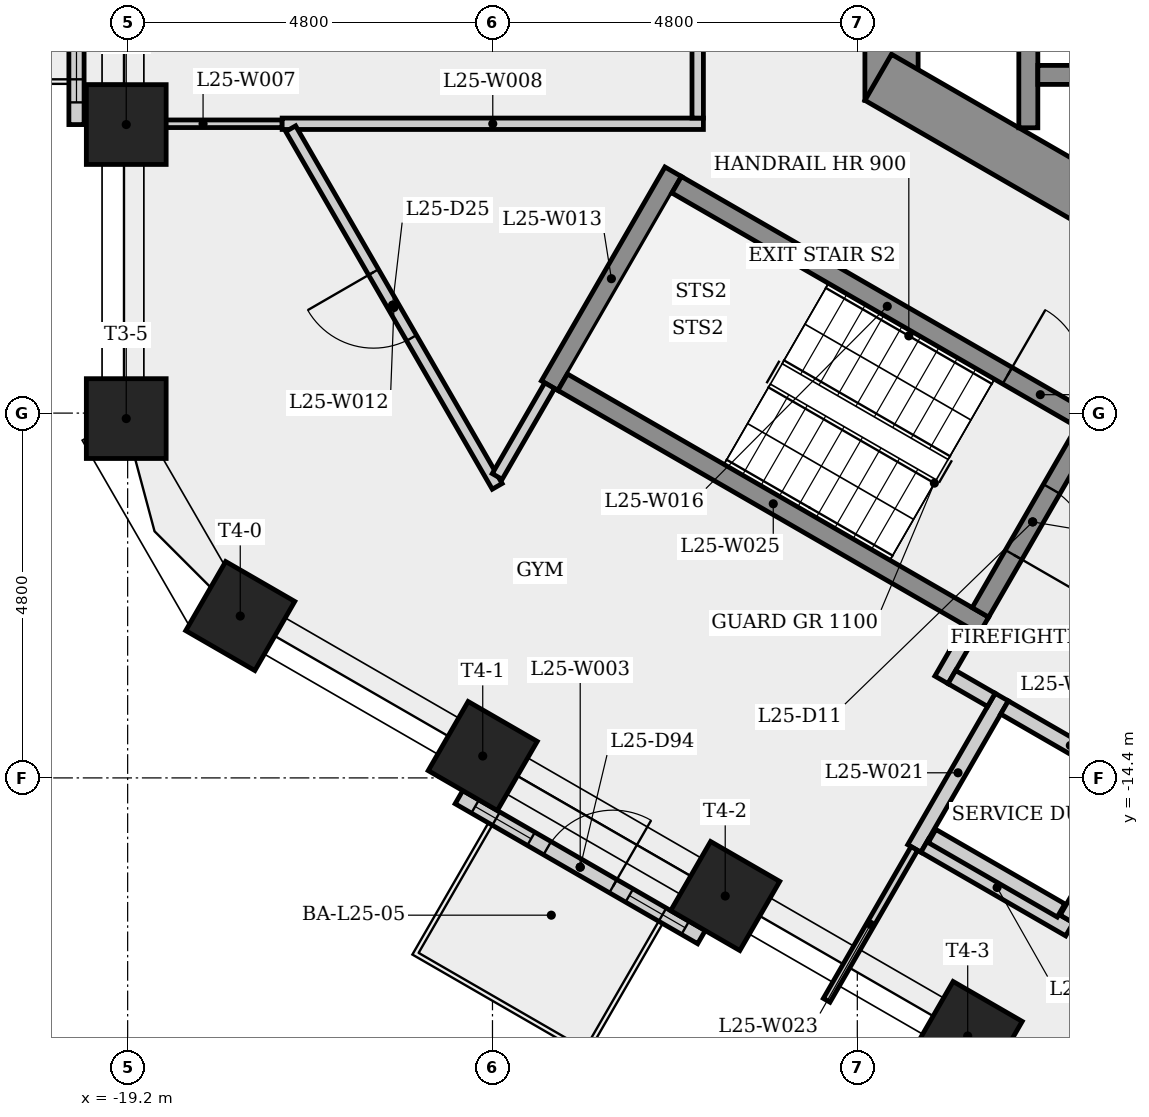
"""IFC4 building model, lengths in metres.
Left out: names, types, materials, properties, quantities, classifications, styles, units other than length and angle.
Written with IfcOpenShell. Run it as: python <this file> out.ifc"""

import sys

from ifc_helpers import new_model, si_unit, direction, frame, frame_2d, origin, origin_2d, place, context, subcontext, project, spatial, rectangle, extrude, element, fill, save


model = new_model("IFC4")
c1 = context("Model", 3, precision=1e-05, world=origin(), true_north=direction((0.0, 1.0)))
c2 = subcontext(c1, "Body", "Model", "MODEL_VIEW")
j1 = project(units=[si_unit("LENGTHUNIT", "METRE"), si_unit("PLANEANGLEUNIT", "RADIAN")], contexts=[c1])
p1 = place(None, origin())
s1 = spatial("IfcSite", under=j1, at=p1, CompositionType="ELEMENT")
p2 = place(p1, origin())
s2 = spatial("IfcBuilding", under=s1, at=p2, CompositionType="ELEMENT")
p3 = place(p2, frame((0.0, 0.0, 96.7)))
s3 = spatial("IfcBuildingStorey", under=s2, at=p3, CompositionType="ELEMENT", Elevation=96.7)
p4 = place(p3, frame((-9.15, 5.485, 0.0), z_axis=(0.0, 0.0, 1.0), x_axis=(0.0, -1.0, 0.0)))
e1 = element("IfcWall", 1, at=p4, inside=s3, PredefinedType="SHEAR", context=c2, shape_type="SweptSolid", body=[
    extrude(rectangle(XDim=10.97, YDim=0.7, at=frame_2d((5.485, 0.0))), origin(), (0.0, 0.0, 1.0), 3.4),
])
p5 = place(p4, frame((4.685, 0.0, 0.0)))
e2 = element("IfcOpeningElement", 2, at=p5, cuts=e1, PredefinedType="OPENING", context=c2, shape_type="SweptSolid", body=[
    extrude(rectangle(XDim=1.6, YDim=2.1, at=frame_2d((0.8, 1.05))), frame((0.0, 0.36, 0.0), z_axis=(0.0, -1.0, 0.0), x_axis=(1.0, 0.0, 0.0)), (0.0, 0.0, 1.0), 0.72),
])
p6 = place(p3, frame((-9.325, -5.182, 0.0), z_axis=(0.0, 0.0, 1.0), x_axis=(0.866023993627, -0.500002442456, 0.0)))
e3 = element("IfcWall", 3, at=p6, inside=s3, PredefinedType="SHEAR", context=c2, shape_type="SweptSolid", body=[
    extrude(rectangle(XDim=10.97, YDim=0.7, at=frame_2d((5.485, 0.0))), origin(), (0.0, 0.0, 1.0), 3.4),
])
p7 = place(p6, frame((3.164, 0.0, 0.0)))
e4 = element("IfcOpeningElement", 4, at=p7, cuts=e3, PredefinedType="OPENING", context=c2, shape_type="SweptSolid", body=[
    extrude(rectangle(XDim=0.9, YDim=2.1, at=frame_2d((0.45, 1.05))), frame((0.0, 0.36, 0.0), z_axis=(0.0, -1.0, 0.0), x_axis=(1.0, 0.0, 0.0)), (0.0, 0.0, 1.0), 0.72),
])
for number, where, z_axis, x_axis in (
    (5, (-19.219, -5.803, 0.0), (0.0, 0.0, 1.0), (-1.0, 0.0, 0.0)),
    (6, (-19.219, -9.672, 0.0), (0.0, 0.0, 1.0), (-1.0, 0.0, 0.0)),
    (7, (-17.719, -12.27, 0.0), (0.0, 0.0, 1.0), (-0.5, -0.866, 0.0)),
    (8, (-14.528, -14.112, 0.0), (0.0, 0.0, 1.0), (-0.5, -0.866, 0.0)),
    (9, (-11.338, -15.954, 0.0), (0.0, 0.0, 1.0), (-0.5, -0.866, 0.0)),
    (10, (-8.148, -17.796, 0.0), (0.0, 0.0, 1.0), (-0.5, -0.866, 0.0)),
):
    element("IfcColumn", number, at=place(p3, frame(where, z_axis=z_axis, x_axis=x_axis)), inside=s3, PredefinedType="COLUMN", context=c2, shape_type="SweptSolid", body=[
        extrude(rectangle(XDim=1.05, YDim=1.05, at=origin_2d()), origin(), (0.0, 0.0, 1.0), 3.4),
    ])
p8 = place(p3, frame((-19.873, -1.935, 0.0), z_axis=(0.0, 0.0, 1.0), x_axis=(0.0, -1.0, 0.0)))
e11 = element("IfcWall", 11, at=p8, inside=s3, PredefinedType="SOLIDWALL", context=c2, shape_type="SweptSolid", body=[
    extrude(rectangle(XDim=3.869, YDim=0.2, at=frame_2d((1.935, 0.0))), origin(), (0.0, 0.0, 1.0), 3.4),
])
p9 = place(p8, frame((1.435, 0.0, 0.0)))
e12 = element("IfcOpeningElement", 12, at=p9, cuts=e11, PredefinedType="OPENING", context=c2, shape_type="SweptSolid", body=[
    extrude(rectangle(XDim=1.0, YDim=2.4, at=frame_2d((0.5, 1.2))), frame((0.0, 0.11, 0.0), z_axis=(0.0, -1.0, 0.0), x_axis=(1.0, 0.0, 0.0)), (0.0, 0.0, 1.0), 0.22),
])
p10 = place(p8, frame((0.292, 0.0, 0.9)))
e13 = element("IfcOpeningElement", 13, at=p10, cuts=e11, PredefinedType="OPENING", context=c2, shape_type="SweptSolid", body=[
    extrude(rectangle(XDim=0.85, YDim=1.5, at=frame_2d((0.425, 0.75))), frame((0.0, 0.11, 0.0), z_axis=(0.0, -1.0, 0.0), x_axis=(1.0, 0.0, 0.0)), (0.0, 0.0, 1.0), 0.22),
])
p11 = place(p8, frame((2.727, 0.0, 0.9)))
e14 = element("IfcOpeningElement", 14, at=p11, cuts=e11, PredefinedType="OPENING", context=c2, shape_type="SweptSolid", body=[
    extrude(rectangle(XDim=0.85, YDim=1.5, at=frame_2d((0.425, 0.75))), frame((0.0, 0.11, 0.0), z_axis=(0.0, -1.0, 0.0), x_axis=(1.0, 0.0, 0.0)), (0.0, 0.0, 1.0), 0.22),
])
p12 = place(p3, frame((-14.841, -14.653, 0.0), z_axis=(0.0, 0.0, 1.0), x_axis=(0.866048742478, -0.499959574017, 0.0)))
e15 = element("IfcWall", 15, at=p12, inside=s3, PredefinedType="SOLIDWALL", context=c2, shape_type="SweptSolid", body=[
    extrude(rectangle(XDim=3.684, YDim=0.2, at=frame_2d((1.842, 0.0))), origin(), (0.0, 0.0, 1.0), 3.4),
])
p13 = place(p12, frame((1.342, 0.0, 0.0)))
e16 = element("IfcOpeningElement", 16, at=p13, cuts=e15, PredefinedType="OPENING", context=c2, shape_type="SweptSolid", body=[
    extrude(rectangle(XDim=1.0, YDim=2.4, at=frame_2d((0.5, 1.2))), frame((0.0, 0.11, 0.0), z_axis=(0.0, -1.0, 0.0), x_axis=(1.0, 0.0, 0.0)), (0.0, 0.0, 1.0), 0.22),
])
p14 = place(p12, frame((0.246, 0.0, 0.9)))
e17 = element("IfcOpeningElement", 17, at=p14, cuts=e15, PredefinedType="OPENING", context=c2, shape_type="SweptSolid", body=[
    extrude(rectangle(XDim=0.85, YDim=1.5, at=frame_2d((0.425, 0.75))), frame((0.0, 0.11, 0.0), z_axis=(0.0, -1.0, 0.0), x_axis=(1.0, 0.0, 0.0)), (0.0, 0.0, 1.0), 0.22),
])
p15 = place(p12, frame((2.588, 0.0, 0.9)))
e18 = element("IfcOpeningElement", 18, at=p15, cuts=e15, PredefinedType="OPENING", context=c2, shape_type="SweptSolid", body=[
    extrude(rectangle(XDim=0.85, YDim=1.5, at=frame_2d((0.425, 0.75))), frame((0.0, 0.11, 0.0), z_axis=(0.0, -1.0, 0.0), x_axis=(1.0, 0.0, 0.0)), (0.0, 0.0, 1.0), 0.22),
])
p16 = place(p3, frame((-17.167, -5.793, 0.0), z_axis=(0.0, 0.0, 1.0), x_axis=(-1.0, 0.0, 0.0)))
e19 = element("IfcWall", 19, at=p16, inside=s3, PredefinedType="PARTITIONING", context=c2, shape_type="SweptSolid", body=[
    extrude(rectangle(XDim=2.081, YDim=0.1, at=frame_2d((1.041, 0.0))), origin(), (0.0, 0.0, 1.0), 3.05),
])
p17 = place(p3, frame((-17.167, -5.793, 0.0), z_axis=(0.0, 0.0, 1.0), x_axis=(1.0, 0.0, 0.0)))
e20 = element("IfcWall", 20, at=p17, inside=s3, PredefinedType="PARTITIONING", context=c2, shape_type="SweptSolid", body=[
    extrude(rectangle(XDim=5.542, YDim=0.15, at=frame_2d((2.771, 0.0))), origin(), (0.0, 0.0, 1.0), 3.05),
])
p18 = place(p3, frame((-14.338, -10.564, 0.0), z_axis=(0.0, 0.0, 1.0), x_axis=(-0.499985629884, 0.866033700216, 0.0)))
e21 = element("IfcWall", 21, at=p18, inside=s3, PredefinedType="PARTITIONING", context=c2, shape_type="SweptSolid", body=[
    extrude(rectangle(XDim=5.434, YDim=0.15, at=frame_2d((2.717, 0.0))), origin(), (0.0, 0.0, 1.0), 3.05),
])
p19 = place(p18, frame((2.254, 0.0, 0.0)))
e22 = element("IfcOpeningElement", 22, at=p19, cuts=e21, PredefinedType="OPENING", context=c2, shape_type="SweptSolid", body=[
    extrude(rectangle(XDim=1.0, YDim=2.1, at=frame_2d((0.5, 1.05))), frame((0.0, 0.085, 0.0), z_axis=(0.0, -1.0, 0.0), x_axis=(1.0, 0.0, 0.0)), (0.0, 0.0, 1.0), 0.17),
])
p20 = place(p3, frame((-13.648, -9.239, 0.0), z_axis=(0.0, 0.0, 1.0), x_axis=(0.500017246033, 0.866015446554, 0.0)))
e23 = element("IfcWall", 23, at=p20, inside=s3, PredefinedType="SHEAR", context=c2, shape_type="SweptSolid", body=[
    extrude(rectangle(XDim=3.25, YDim=0.25, at=frame_2d((1.625, 0.0))), origin(), (0.0, 0.0, 1.0), 3.05),
])
p21 = place(p3, frame((-13.648, -9.239, 0.0), z_axis=(0.0, 0.0, 1.0), x_axis=(-0.500115484592, -0.865958718457, 0.0)))
e24 = element("IfcWall", 24, at=p21, inside=s3, PredefinedType="PARTITIONING", context=c2, shape_type="SweptSolid", body=[
    extrude(rectangle(XDim=1.38, YDim=0.15, at=frame_2d((0.69, 0.0))), origin(), (0.0, 0.0, 1.0), 3.05),
])
p22 = place(p3, frame((-11.977, -6.595, 0.0), z_axis=(0.0, 0.0, 1.0), x_axis=(0.866025499775, -0.499999833739, 0.0)))
e25 = element("IfcWall", 25, at=p22, inside=s3, PredefinedType="SHEAR", context=c2, shape_type="SweptSolid", body=[
    extrude(rectangle(XDim=6.4, YDim=0.25, at=frame_2d((3.2, 0.0))), origin(), (0.0, 0.0, 1.0), 3.05),
])
p23 = place(p22, frame((5.025, 0.0, 0.0)))
e26 = element("IfcOpeningElement", 26, at=p23, cuts=e25, PredefinedType="OPENING", context=c2, shape_type="SweptSolid", body=[
    extrude(rectangle(XDim=1.0, YDim=2.1, at=frame_2d((0.5, 1.05))), frame((0.0, 0.135, 0.0), z_axis=(0.0, -1.0, 0.0), x_axis=(1.0, 0.0, 0.0)), (0.0, 0.0, 1.0), 0.27),
])
p24 = place(p3, frame((-11.7, -5.718, 0.0), z_axis=(0.0, 0.0, 1.0), x_axis=(0.0, 1.0, 0.0)))
e27 = element("IfcWall", 27, at=p24, inside=s3, PredefinedType="PARTITIONING", context=c2, shape_type="SweptSolid", body=[
    extrude(rectangle(XDim=11.436, YDim=0.15, at=frame_2d((5.718, 0.0))), origin(), (0.0, 0.0, 1.0), 3.05),
])
p25 = place(p24, frame((8.092, 0.0, 0.0)))
e28 = element("IfcOpeningElement", 28, at=p25, cuts=e27, PredefinedType="OPENING", context=c2, shape_type="SweptSolid", body=[
    extrude(rectangle(XDim=1.0, YDim=2.1, at=frame_2d((0.5, 1.05))), frame((0.0, 0.085, 0.0), z_axis=(0.0, -1.0, 0.0), x_axis=(1.0, 0.0, 0.0)), (0.0, 0.0, 1.0), 0.17),
])
p26 = place(p24, frame((2.344, 0.0, 0.0)))
e29 = element("IfcOpeningElement", 29, at=p26, cuts=e27, PredefinedType="OPENING", context=c2, shape_type="SweptSolid", body=[
    extrude(rectangle(XDim=1.0, YDim=2.1, at=frame_2d((0.5, 1.05))), frame((0.0, 0.085, 0.0), z_axis=(0.0, -1.0, 0.0), x_axis=(1.0, 0.0, 0.0)), (0.0, 0.0, 1.0), 0.17),
])
p27 = place(p3, frame((-8.85, -15.329, 0.0), z_axis=(0.0, 0.0, 1.0), x_axis=(0.500077740698, 0.865980515519, 0.0)))
e30 = element("IfcWall", 30, at=p27, inside=s3, PredefinedType="PLUMBINGWALL", context=c2, shape_type="SweptSolid", body=[
    extrude(rectangle(XDim=2.3, YDim=0.2, at=frame_2d((1.15, 0.0))), origin(), (0.0, 0.0, 1.0), 3.05),
])
p28 = place(p3, frame((-8.85, -15.329, 0.0), z_axis=(0.0, 0.0, 1.0), x_axis=(-0.500009533716, -0.866019899421, 0.0)))
e31 = element("IfcWall", 31, at=p28, inside=s3, PredefinedType="PARTITIONING", context=c2, shape_type="SweptSolid", body=[
    extrude(rectangle(XDim=2.307, YDim=0.1, at=frame_2d((1.153, 0.0))), origin(), (0.0, 0.0, 1.0), 3.05),
])
p29 = place(p3, frame((-8.493, -13.11, 0.0), z_axis=(0.0, 0.0, 1.0), x_axis=(0.500067724834, 0.865986299303, 0.0)))
e32 = element("IfcWall", 32, at=p29, inside=s3, PredefinedType="PARTITIONING", context=c2, shape_type="SweptSolid", body=[
    extrude(rectangle(XDim=0.775, YDim=0.2, at=frame_2d((0.388, 0.0))), origin(), (0.0, 0.0, 1.0), 3.05),
])
p30 = place(p3, frame((-7.935, -12.393, 0.0), z_axis=(0.0, 0.0, 1.0), x_axis=(-0.866025499775, 0.499999833739, 0.0)))
e33 = element("IfcWall", 33, at=p30, inside=s3, PredefinedType="SHEAR", context=c2, shape_type="SweptSolid", body=[
    extrude(rectangle(XDim=6.4, YDim=0.25, at=frame_2d((3.2, 0.0))), origin(), (0.0, 0.0, 1.0), 3.05),
])
p31 = place(p3, frame((-7.836, -13.373, 0.0), z_axis=(0.0, 0.0, 1.0), x_axis=(-0.866232998003, 0.499640263761, 0.0)))
e34 = element("IfcWall", 34, at=p31, inside=s3, PredefinedType="PARTITIONING", context=c2, shape_type="SweptSolid", body=[
    extrude(rectangle(XDim=0.6, YDim=0.2, at=frame_2d((0.3, 0.0))), origin(), (0.0, 0.0, 1.0), 3.05),
])
p32 = place(p3, frame((-7.35, -5.846, 0.0), z_axis=(0.0, 0.0, 1.0), x_axis=(0.0, 1.0, 0.0)))
e35 = element("IfcWall", 35, at=p32, inside=s3, PredefinedType="SHEAR", context=c2, shape_type="SweptSolid", body=[
    extrude(rectangle(XDim=4.171, YDim=0.25, at=frame_2d((2.085, 0.0))), origin(), (0.0, 0.0, 1.0), 3.05),
])
p33 = place(p3, frame((-6.808, -16.392, 0.0), z_axis=(0.0, 0.0, 1.0), x_axis=(-0.866008176907, 0.50002983664, 0.0)))
e36 = element("IfcWall", 36, at=p33, inside=s3, PredefinedType="PLUMBINGWALL", context=c2, shape_type="SweptSolid", body=[
    extrude(rectangle(XDim=2.2, YDim=0.2, at=frame_2d((1.1, 0.0))), origin(), (0.0, 0.0, 1.0), 3.05),
])
p34 = place(p3, frame((-6.605, -9.841, 0.0), z_axis=(0.0, 0.0, 1.0), x_axis=(-0.499996545922, -0.866027397988, 0.0)))
e37 = element("IfcWall", 37, at=p34, inside=s3, PredefinedType="SHEAR", context=c2, shape_type="SweptSolid", body=[
    extrude(rectangle(XDim=2.75, YDim=0.25, at=frame_2d((1.375, 0.0))), origin(), (0.0, 0.0, 1.0), 3.05),
])
p35 = place(p34, frame((0.875, 0.0, 0.0)))
e38 = element("IfcOpeningElement", 38, at=p35, cuts=e37, PredefinedType="OPENING", context=c2, shape_type="SweptSolid", body=[
    extrude(rectangle(XDim=1.0, YDim=2.1, at=frame_2d((0.5, 1.05))), frame((0.0, 0.135, 0.0), z_axis=(0.0, -1.0, 0.0), x_axis=(1.0, 0.0, 0.0)), (0.0, 0.0, 1.0), 0.27),
])
p36 = place(p3, frame((-5.795, -14.437, 0.0), z_axis=(0.0, 0.0, 1.0), x_axis=(-0.500027713859, -0.866009402589, 0.0)))
e39 = element("IfcWall", 39, at=p36, inside=s3, PredefinedType="PLUMBINGWALL", context=c2, shape_type="SweptSolid", body=[
    extrude(rectangle(XDim=2.1, YDim=0.2, at=frame_2d((1.05, 0.0))), origin(), (0.0, 0.0, 1.0), 3.05),
])
p37 = place(p3, frame((-5.931, -14.473, 0.0), z_axis=(0.0, 0.0, 1.0), x_axis=(-0.866041268327, 0.499972520799, 0.0)))
e40 = element("IfcWall", 40, at=p37, inside=s3, PredefinedType="PLUMBINGWALL", context=c2, shape_type="SweptSolid", body=[
    extrude(rectangle(XDim=2.0, YDim=0.2, at=frame_2d((1.0, 0.0))), origin(), (0.0, 0.0, 1.0), 3.05),
])
p38 = place(p3, frame((-7.225, -5.15, 0.0), z_axis=(0.0, 0.0, 1.0), x_axis=(1.0, 0.0, 0.0)))
e41 = element("IfcWall", 41, at=p38, inside=s3, PredefinedType="SHEAR", context=c2, shape_type="SweptSolid", body=[
    extrude(rectangle(XDim=14.7, YDim=0.25, at=frame_2d((7.35, 0.0))), origin(), (0.0, 0.0, 1.0), 3.05),
])
p39 = place(p3, frame((-6.919, -16.144, 0.0), z_axis=(0.0, 0.0, 1.0), x_axis=(-0.866042469362, 0.499970440388, 0.0)))
e42 = element("IfcWall", 42, at=p39, inside=s3, PredefinedType="PLUMBINGWALL", context=c2, shape_type="SweptSolid", body=[
    extrude(rectangle(XDim=1.96, YDim=0.2, at=frame_2d((0.98, 0.0))), origin(), (0.0, 0.0, 1.0), 3.05),
])
p40 = place(p11, origin())
e43 = element("IfcWindow", 43, at=p40, inside=s3, PartitioningType="SINGLE_PANEL", PredefinedType="WINDOW", context=c2, shape_type="SweptSolid", body=[
    extrude(rectangle(XDim=0.85, YDim=1.5, at=frame_2d((0.425, 0.75))), frame((0.0, 0.03, 0.0), z_axis=(0.0, -1.0, 0.0), x_axis=(1.0, 0.0, 0.0)), (0.0, 0.0, 1.0), 0.06),
])
fill(e14, e43)
p41 = place(p13, origin())
e44 = element("IfcDoor", 44, at=p41, inside=s3, OperationType="SINGLE_SWING_RIGHT", PredefinedType="DOOR", context=c2, shape_type="SweptSolid", body=[
    extrude(rectangle(XDim=1.0, YDim=2.4, at=frame_2d((0.5, 1.2))), frame((0.0, 0.025, 0.0), z_axis=(0.0, -1.0, 0.0), x_axis=(1.0, 0.0, 0.0)), (0.0, 0.0, 1.0), 0.05),
])
fill(e16, e44)
p42 = place(p14, origin())
e45 = element("IfcWindow", 45, at=p42, inside=s3, PartitioningType="SINGLE_PANEL", PredefinedType="WINDOW", context=c2, shape_type="SweptSolid", body=[
    extrude(rectangle(XDim=0.85, YDim=1.5, at=frame_2d((0.425, 0.75))), frame((0.0, 0.03, 0.0), z_axis=(0.0, -1.0, 0.0), x_axis=(1.0, 0.0, 0.0)), (0.0, 0.0, 1.0), 0.06),
])
fill(e17, e45)
p43 = place(p15, origin())
e46 = element("IfcWindow", 46, at=p43, inside=s3, PartitioningType="SINGLE_PANEL", PredefinedType="WINDOW", context=c2, shape_type="SweptSolid", body=[
    extrude(rectangle(XDim=0.85, YDim=1.5, at=frame_2d((0.425, 0.75))), frame((0.0, 0.03, 0.0), z_axis=(0.0, -1.0, 0.0), x_axis=(1.0, 0.0, 0.0)), (0.0, 0.0, 1.0), 0.06),
])
fill(e18, e46)
p44 = place(p23, origin())
e47 = element("IfcDoor", 47, at=p44, inside=s3, OperationType="SINGLE_SWING_LEFT", PredefinedType="DOOR", context=c2, shape_type="SweptSolid", body=[
    extrude(rectangle(XDim=1.0, YDim=2.1, at=frame_2d((0.5, 1.05))), frame((0.0, 0.025, 0.0), z_axis=(0.0, -1.0, 0.0), x_axis=(1.0, 0.0, 0.0)), (0.0, 0.0, 1.0), 0.05),
])
fill(e26, e47)
p45 = place(p35, origin())
e48 = element("IfcDoor", 48, at=p45, inside=s3, OperationType="SINGLE_SWING_RIGHT", PredefinedType="DOOR", context=c2, shape_type="SweptSolid", body=[
    extrude(rectangle(XDim=1.0, YDim=2.1, at=frame_2d((0.5, 1.05))), frame((0.0, 0.025, 0.0), z_axis=(0.0, -1.0, 0.0), x_axis=(1.0, 0.0, 0.0)), (0.0, 0.0, 1.0), 0.05),
])
fill(e38, e48)
p46 = place(p19, origin())
e49 = element("IfcDoor", 49, at=p46, inside=s3, OperationType="SINGLE_SWING_RIGHT", PredefinedType="DOOR", context=c2, shape_type="SweptSolid", body=[
    extrude(rectangle(XDim=1.0, YDim=2.1, at=frame_2d((0.5, 1.05))), frame((0.0, 0.025, 0.0), z_axis=(0.0, -1.0, 0.0), x_axis=(1.0, 0.0, 0.0)), (0.0, 0.0, 1.0), 0.05),
])
fill(e22, e49)
save(model, sys.argv[1])
